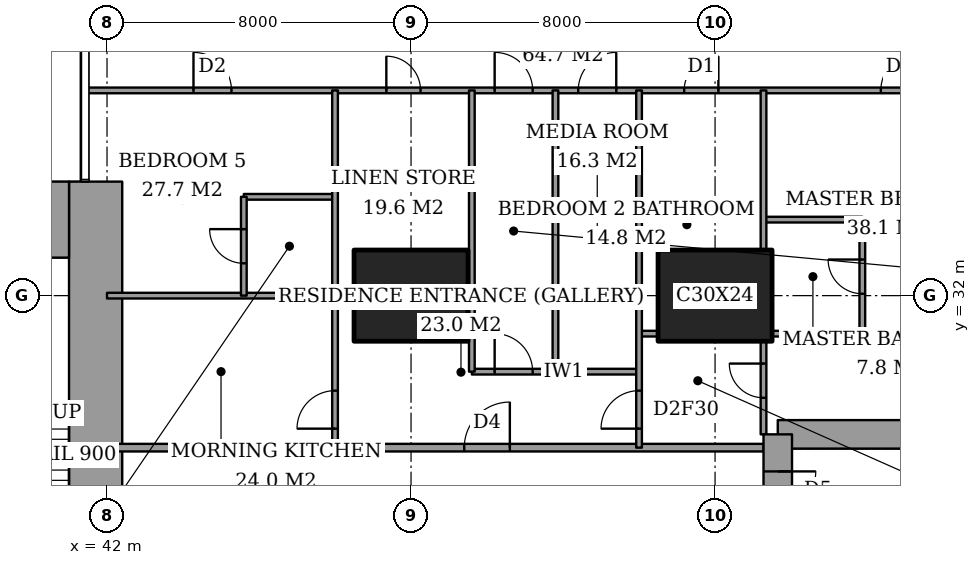
"""IFC4 building model, lengths in metres.
Left out: names, types, materials, properties, quantities, classifications, styles, units other than length and angle.
Written with IfcOpenShell. Run it as: python <this file> out.ifc"""

import sys

from ifc_helpers import new_model, si_unit, direction, frame, frame_2d, origin, origin_2d, place, context, subcontext, project, spatial, rectangle, extrude, element, fill, save


model = new_model("IFC4")
c1 = context("Model", 3, precision=1e-05, world=origin(), true_north=direction((0.0, 1.0)))
c2 = subcontext(c1, "Body", "Model", "MODEL_VIEW")
j1 = project(units=[si_unit("LENGTHUNIT", "METRE"), si_unit("PLANEANGLEUNIT", "RADIAN")], contexts=[c1])
p1 = place(None, origin())
s1 = spatial("IfcSite", under=j1, at=p1, CompositionType="ELEMENT")
p2 = place(p1, origin())
s2 = spatial("IfcBuilding", under=s1, at=p2, CompositionType="ELEMENT")
p3 = place(p2, frame((0.0, 0.0, 214.6)))
s3 = spatial("IfcBuildingStorey", under=s2, at=p3, CompositionType="ELEMENT", Elevation=214.6)
for number, where, z_axis, x_axis in (
    (1, (50.0, 32.0, 0.0), (0.0, 0.0, 1.0), (1.0, 0.0, 0.0)),
    (2, (58.0, 32.0, 0.0), (0.0, 0.0, 1.0), (1.0, 0.0, 0.0)),
):
    element("IfcColumn", number, at=place(p3, frame(where, z_axis=z_axis, x_axis=x_axis)), inside=s3, PredefinedType="COLUMN", context=c2, shape_type="SweptSolid", body=[
        extrude(rectangle(XDim=3.0, YDim=2.4, at=origin_2d()), origin(), (0.0, 0.0, 1.0), 3.6),
    ])
p4 = place(p3, frame((37.85, 34.0, 0.0), z_axis=(0.0, 0.0, 1.0), x_axis=(1.0, 0.0, 0.0)))
e3 = element("IfcWall", 3, at=p4, inside=s3, PredefinedType="SHEAR", context=c2, shape_type="SweptSolid", body=[
    extrude(rectangle(XDim=3.15, YDim=2.0, at=frame_2d((1.575, 0.0))), origin(), (0.0, 0.0, 1.0), 3.6),
])
p5 = place(p3, frame((41.7, 24.85, 0.0), z_axis=(0.0, 0.0, 1.0), x_axis=(0.0, 1.0, 0.0)))
e4 = element("IfcWall", 4, at=p5, inside=s3, PredefinedType="SHEAR", context=c2, shape_type="SweptSolid", body=[
    extrude(rectangle(XDim=10.15, YDim=1.4, at=frame_2d((5.075, 0.0))), origin(), (0.0, 0.0, 1.0), 3.6),
])
p6 = place(p3, frame((64.1, 28.35, 0.0), z_axis=(0.0, 0.0, 1.0), x_axis=(-1.0, 0.0, 0.0)))
e5 = element("IfcWall", 5, at=p6, inside=s3, PredefinedType="SHEAR", context=c2, shape_type="SweptSolid", body=[
    extrude(rectangle(XDim=4.45, YDim=0.75, at=frame_2d((2.225, 0.0))), origin(), (0.0, 0.0, 1.0), 3.6),
])
p7 = place(p3, frame((59.65, 28.35, 0.0), z_axis=(0.0, 0.0, 1.0), x_axis=(0.0, -1.0, 0.0)))
e6 = element("IfcWall", 6, at=p7, inside=s3, PredefinedType="SHEAR", context=c2, shape_type="SweptSolid", body=[
    extrude(rectangle(XDim=8.7, YDim=0.75, at=frame_2d((4.35, 0.0))), origin(), (0.0, 0.0, 1.0), 3.6),
])
p8 = place(p7, frame((0.975, 0.0, 0.0)))
e7 = element("IfcOpeningElement", 7, at=p8, cuts=e6, PredefinedType="OPENING", context=c2, shape_type="SweptSolid", body=[
    extrude(rectangle(XDim=1.0, YDim=2.1, at=frame_2d((0.5, 1.05))), frame((0.0, 0.385, 0.0), z_axis=(0.0, -1.0, 0.0), x_axis=(1.0, 0.0, 0.0)), (0.0, 0.0, 1.0), 0.77),
])
p9 = place(p3, frame((42.0, 28.0, 0.0), z_axis=(0.0, 0.0, 1.0), x_axis=(1.0, 0.0, 0.0)))
e8 = element("IfcWall", 8, at=p9, inside=s3, PredefinedType="PARTITIONING", context=c2, shape_type="SweptSolid", body=[
    extrude(rectangle(XDim=17.275, YDim=0.2, at=frame_2d((8.637, 0.0))), origin(), (0.0, 0.0, 1.0), 3.35),
])
p10 = place(p9, frame((9.4, 0.0, 0.0)))
e9 = element("IfcOpeningElement", 9, at=p10, cuts=e8, PredefinedType="OPENING", context=c2, shape_type="SweptSolid", body=[
    extrude(rectangle(XDim=1.2, YDim=2.4, at=frame_2d((0.6, 1.2))), frame((0.0, 0.11, 0.0), z_axis=(0.0, -1.0, 0.0), x_axis=(1.0, 0.0, 0.0)), (0.0, 0.0, 1.0), 0.22),
])
p11 = place(p3, frame((51.6, 30.0, 0.0), z_axis=(0.0, 0.0, 1.0), x_axis=(1.0, 0.0, 0.0)))
e10 = element("IfcWall", 10, at=p11, inside=s3, PredefinedType="PARTITIONING", context=c2, shape_type="SweptSolid", body=[
    extrude(rectangle(XDim=4.4, YDim=0.15, at=frame_2d((2.2, 0.0))), origin(), (0.0, 0.0, 1.0), 3.35),
])
p12 = place(p11, frame((0.6, 0.0, 0.0)))
e11 = element("IfcOpeningElement", 11, at=p12, cuts=e10, PredefinedType="OPENING", context=c2, shape_type="SweptSolid", body=[
    extrude(rectangle(XDim=1.0, YDim=2.1, at=frame_2d((0.5, 1.05))), frame((0.0, 0.085, 0.0), z_axis=(0.0, -1.0, 0.0), x_axis=(1.0, 0.0, 0.0)), (0.0, 0.0, 1.0), 0.17),
])
p13 = place(p3, frame((56.0, 31.0, 0.0), z_axis=(0.0, 0.0, 1.0), x_axis=(1.0, 0.0, 0.0)))
e12 = element("IfcWall", 12, at=p13, inside=s3, PredefinedType="PARTITIONING", context=c2, shape_type="SweptSolid", body=[
    extrude(rectangle(XDim=0.5, YDim=0.15, at=frame_2d((0.25, 0.0))), origin(), (0.0, 0.0, 1.0), 3.35),
])
p14 = place(p3, frame((59.5, 31.0, 0.0), z_axis=(0.0, 0.0, 1.0), x_axis=(1.0, 0.0, 0.0)))
e13 = element("IfcWall", 13, at=p14, inside=s3, PredefinedType="PARTITIONING", context=c2, shape_type="SweptSolid", body=[
    extrude(rectangle(XDim=6.95, YDim=0.15, at=frame_2d((3.475, 0.0))), origin(), (0.0, 0.0, 1.0), 3.35),
])
p15 = place(p3, frame((48.0, 31.95, 0.0), z_axis=(0.0, 0.0, 1.0), x_axis=(1.0, 0.0, 0.0)))
e14 = element("IfcWall", 14, at=p15, inside=s3, PredefinedType="PARTITIONING", context=c2, shape_type="SweptSolid", body=[
    extrude(rectangle(XDim=0.5, YDim=0.15, at=frame_2d((0.25, 0.0))), origin(), (0.0, 0.0, 1.0), 2.634),
])
p16 = place(p3, frame((42.0, 32.0, 0.0), z_axis=(0.0, 0.0, 1.0), x_axis=(1.0, 0.0, 0.0)))
e15 = element("IfcWall", 15, at=p16, inside=s3, PredefinedType="PARTITIONING", context=c2, shape_type="SweptSolid", body=[
    extrude(rectangle(XDim=6.0, YDim=0.15, at=frame_2d((3.0, 0.0))), origin(), (0.0, 0.0, 1.0), 2.634),
])
p17 = place(p3, frame((59.275, 34.0, 0.0), z_axis=(0.0, 0.0, 1.0), x_axis=(1.0, 0.0, 0.0)))
e16 = element("IfcWall", 16, at=p17, inside=s3, PredefinedType="PARTITIONING", context=c2, shape_type="SweptSolid", body=[
    extrude(rectangle(XDim=2.6, YDim=0.15, at=frame_2d((1.3, 0.0))), origin(), (0.0, 0.0, 1.0), 3.35),
])
p18 = place(p3, frame((45.6, 34.6, 0.0), z_axis=(0.0, 0.0, 1.0), x_axis=(1.0, 0.0, 0.0)))
e17 = element("IfcWall", 17, at=p18, inside=s3, PredefinedType="PARTITIONING", context=c2, shape_type="SweptSolid", body=[
    extrude(rectangle(XDim=2.4, YDim=0.15, at=frame_2d((1.2, 0.0))), origin(), (0.0, 0.0, 1.0), 3.35),
])
p19 = place(p3, frame((41.439, 37.4, 0.0), z_axis=(0.0, 0.0, 1.0), x_axis=(1.0, 0.0, 0.0)))
e18 = element("IfcWall", 18, at=p19, inside=s3, PredefinedType="PARTITIONING", context=c2, shape_type="SweptSolid", body=[
    extrude(rectangle(XDim=25.011, YDim=0.15, at=frame_2d((12.505, 0.0))), origin(), (0.0, 0.0, 1.0), 3.35),
])
p20 = place(p19, frame((10.761, 0.0, 0.0)))
e19 = element("IfcOpeningElement", 19, at=p20, cuts=e18, PredefinedType="OPENING", context=c2, shape_type="SweptSolid", body=[
    extrude(rectangle(XDim=1.0, YDim=2.1, at=frame_2d((0.5, 1.05))), frame((0.0, 0.085, 0.0), z_axis=(0.0, -1.0, 0.0), x_axis=(1.0, 0.0, 0.0)), (0.0, 0.0, 1.0), 0.17),
])
p21 = place(p19, frame((20.924, 0.0, 0.0)))
e20 = element("IfcOpeningElement", 20, at=p21, cuts=e18, PredefinedType="OPENING", context=c2, shape_type="SweptSolid", body=[
    extrude(rectangle(XDim=1.0, YDim=2.1, at=frame_2d((0.5, 1.05))), frame((0.0, 0.085, 0.0), z_axis=(0.0, -1.0, 0.0), x_axis=(1.0, 0.0, 0.0)), (0.0, 0.0, 1.0), 0.17),
])
p22 = place(p19, frame((15.749, 0.0, 0.0)))
e21 = element("IfcOpeningElement", 21, at=p22, cuts=e18, PredefinedType="OPENING", context=c2, shape_type="SweptSolid", body=[
    extrude(rectangle(XDim=0.9, YDim=2.1, at=frame_2d((0.45, 1.05))), frame((0.0, 0.085, 0.0), z_axis=(0.0, -1.0, 0.0), x_axis=(1.0, 0.0, 0.0)), (0.0, 0.0, 1.0), 0.17),
])
p23 = place(p19, frame((12.961, 0.0, 0.0)))
e22 = element("IfcOpeningElement", 22, at=p23, cuts=e18, PredefinedType="OPENING", context=c2, shape_type="SweptSolid", body=[
    extrude(rectangle(XDim=1.0, YDim=2.1, at=frame_2d((0.5, 1.05))), frame((0.0, 0.085, 0.0), z_axis=(0.0, -1.0, 0.0), x_axis=(1.0, 0.0, 0.0)), (0.0, 0.0, 1.0), 0.17),
])
p24 = place(p19, frame((7.911, 0.0, 0.0)))
e23 = element("IfcOpeningElement", 23, at=p24, cuts=e18, PredefinedType="OPENING", context=c2, shape_type="SweptSolid", body=[
    extrude(rectangle(XDim=0.9, YDim=2.1, at=frame_2d((0.45, 1.05))), frame((0.0, 0.085, 0.0), z_axis=(0.0, -1.0, 0.0), x_axis=(1.0, 0.0, 0.0)), (0.0, 0.0, 1.0), 0.17),
])
p25 = place(p19, frame((2.836, 0.0, 0.0)))
e24 = element("IfcOpeningElement", 24, at=p25, cuts=e18, PredefinedType="OPENING", context=c2, shape_type="SweptSolid", body=[
    extrude(rectangle(XDim=1.0, YDim=2.1, at=frame_2d((0.5, 1.05))), frame((0.0, 0.085, 0.0), z_axis=(0.0, -1.0, 0.0), x_axis=(1.0, 0.0, 0.0)), (0.0, 0.0, 1.0), 0.17),
])
p26 = place(p3, frame((45.6, 32.0, 0.0), z_axis=(0.0, 0.0, 1.0), x_axis=(0.0, 1.0, 0.0)))
e25 = element("IfcWall", 25, at=p26, inside=s3, PredefinedType="PARTITIONING", context=c2, shape_type="SweptSolid", body=[
    extrude(rectangle(XDim=2.6, YDim=0.15, at=frame_2d((1.3, 0.0))), origin(), (0.0, 0.0, 1.0), 3.35),
])
p27 = place(p26, frame((0.85, 0.0, 0.0)))
e26 = element("IfcOpeningElement", 26, at=p27, cuts=e25, PredefinedType="OPENING", context=c2, shape_type="SweptSolid", body=[
    extrude(rectangle(XDim=0.9, YDim=2.1, at=frame_2d((0.45, 1.05))), frame((0.0, 0.085, 0.0), z_axis=(0.0, -1.0, 0.0), x_axis=(1.0, 0.0, 0.0)), (0.0, 0.0, 1.0), 0.17),
])
p28 = place(p3, frame((48.0, 28.0, 0.0), z_axis=(0.0, 0.0, 1.0), x_axis=(0.0, 1.0, 0.0)))
e27 = element("IfcWall", 27, at=p28, inside=s3, PredefinedType="PARTITIONING", context=c2, shape_type="SweptSolid", body=[
    extrude(rectangle(XDim=9.4, YDim=0.15, at=frame_2d((4.7, 0.0))), origin(), (0.0, 0.0, 1.0), 3.35),
])
p29 = place(p28, frame((0.5, 0.0, 0.0)))
e28 = element("IfcOpeningElement", 28, at=p29, cuts=e27, PredefinedType="OPENING", context=c2, shape_type="SweptSolid", body=[
    extrude(rectangle(XDim=1.0, YDim=2.1, at=frame_2d((0.5, 1.05))), frame((0.0, 0.085, 0.0), z_axis=(0.0, -1.0, 0.0), x_axis=(1.0, 0.0, 0.0)), (0.0, 0.0, 1.0), 0.17),
])
for number, where, z_axis, x_axis in (
    (29, (51.6, 30.0, 0.0), (0.0, 0.0, 1.0), (0.0, 1.0, 0.0)),
    (30, (53.8, 30.0, 0.0), (0.0, 0.0, 1.0), (0.0, 1.0, 0.0)),
):
    element("IfcWall", number, at=place(p3, frame(where, z_axis=z_axis, x_axis=x_axis)), inside=s3, PredefinedType="PARTITIONING", context=c2, shape_type="SweptSolid", body=[
        extrude(rectangle(XDim=7.4, YDim=0.15, at=frame_2d((3.7, 0.0))), origin(), (0.0, 0.0, 1.0), 3.35),
    ])
p30 = place(p3, frame((56.0, 28.0, 0.0), z_axis=(0.0, 0.0, 1.0), x_axis=(0.0, 1.0, 0.0)))
e31 = element("IfcWall", 31, at=p30, inside=s3, PredefinedType="PARTITIONING", context=c2, shape_type="SweptSolid", body=[
    extrude(rectangle(XDim=9.4, YDim=0.15, at=frame_2d((4.7, 0.0))), origin(), (0.0, 0.0, 1.0), 3.35),
])
p31 = place(p30, frame((0.5, 0.0, 0.0)))
e32 = element("IfcOpeningElement", 32, at=p31, cuts=e31, PredefinedType="OPENING", context=c2, shape_type="SweptSolid", body=[
    extrude(rectangle(XDim=1.0, YDim=2.1, at=frame_2d((0.5, 1.05))), frame((0.0, 0.085, 0.0), z_axis=(0.0, -1.0, 0.0), x_axis=(1.0, 0.0, 0.0)), (0.0, 0.0, 1.0), 0.17),
])
p32 = place(p3, frame((59.275, 28.35, 0.0), z_axis=(0.0, 0.0, 1.0), x_axis=(0.0, 1.0, 0.0)))
e33 = element("IfcWall", 33, at=p32, inside=s3, PredefinedType="PARTITIONING", context=c2, shape_type="SweptSolid", body=[
    extrude(rectangle(XDim=2.45, YDim=0.15, at=frame_2d((1.225, 0.0))), origin(), (0.0, 0.0, 1.0), 3.35),
])
p33 = place(p32, frame((0.962, 0.0, 0.0)))
e34 = element("IfcOpeningElement", 34, at=p33, cuts=e33, PredefinedType="OPENING", context=c2, shape_type="SweptSolid", body=[
    extrude(rectangle(XDim=0.9, YDim=2.1, at=frame_2d((0.45, 1.05))), frame((0.0, 0.085, 0.0), z_axis=(0.0, -1.0, 0.0), x_axis=(1.0, 0.0, 0.0)), (0.0, 0.0, 1.0), 0.17),
])
p34 = place(p3, frame((59.275, 33.2, 0.0), z_axis=(0.0, 0.0, 1.0), x_axis=(0.0, 1.0, 0.0)))
e35 = element("IfcWall", 35, at=p34, inside=s3, PredefinedType="PARTITIONING", context=c2, shape_type="SweptSolid", body=[
    extrude(rectangle(XDim=4.2, YDim=0.15, at=frame_2d((2.1, 0.0))), origin(), (0.0, 0.0, 1.0), 3.35),
])
p35 = place(p3, frame((61.875, 31.0, 0.0), z_axis=(0.0, 0.0, 1.0), x_axis=(0.0, 1.0, 0.0)))
e36 = element("IfcWall", 36, at=p35, inside=s3, PredefinedType="PARTITIONING", context=c2, shape_type="SweptSolid", body=[
    extrude(rectangle(XDim=3.0, YDim=0.15, at=frame_2d((1.5, 0.0))), origin(), (0.0, 0.0, 1.0), 3.35),
])
p36 = place(p35, frame((1.05, 0.0, 0.0)))
e37 = element("IfcOpeningElement", 37, at=p36, cuts=e36, PredefinedType="OPENING", context=c2, shape_type="SweptSolid", body=[
    extrude(rectangle(XDim=0.9, YDim=2.1, at=frame_2d((0.45, 1.05))), frame((0.0, 0.085, 0.0), z_axis=(0.0, -1.0, 0.0), x_axis=(1.0, 0.0, 0.0)), (0.0, 0.0, 1.0), 0.17),
])
p37 = place(p20, origin())
e38 = element("IfcDoor", 38, at=p37, inside=s3, OperationType="SINGLE_SWING_RIGHT", PredefinedType="DOOR", context=c2, shape_type="SweptSolid", body=[
    extrude(rectangle(XDim=1.0, YDim=2.1, at=frame_2d((0.5, 1.05))), frame((0.0, 0.025, 0.0), z_axis=(0.0, -1.0, 0.0), x_axis=(1.0, 0.0, 0.0)), (0.0, 0.0, 1.0), 0.05),
])
fill(e19, e38)
p38 = place(p36, origin())
e39 = element("IfcDoor", 39, at=p38, inside=s3, OperationType="SINGLE_SWING_LEFT", PredefinedType="DOOR", context=c2, shape_type="SweptSolid", body=[
    extrude(rectangle(XDim=0.9, YDim=2.1, at=frame_2d((0.45, 1.05))), frame((0.0, 0.025, 0.0), z_axis=(0.0, -1.0, 0.0), x_axis=(1.0, 0.0, 0.0)), (0.0, 0.0, 1.0), 0.05),
])
fill(e37, e39)
p39 = place(p21, origin())
e40 = element("IfcDoor", 40, at=p39, inside=s3, OperationType="SINGLE_SWING_LEFT", PredefinedType="DOOR", context=c2, shape_type="SweptSolid", body=[
    extrude(rectangle(XDim=1.0, YDim=2.1, at=frame_2d((0.5, 1.05))), frame((0.0, 0.025, 0.0), z_axis=(0.0, -1.0, 0.0), x_axis=(1.0, 0.0, 0.0)), (0.0, 0.0, 1.0), 0.05),
])
fill(e20, e40)
p40 = place(p33, origin())
e41 = element("IfcDoor", 41, at=p40, inside=s3, OperationType="SINGLE_SWING_LEFT", PredefinedType="DOOR", context=c2, shape_type="SweptSolid", body=[
    extrude(rectangle(XDim=0.9, YDim=2.1, at=frame_2d((0.45, 1.05))), frame((0.0, 0.025, 0.0), z_axis=(0.0, -1.0, 0.0), x_axis=(1.0, 0.0, 0.0)), (0.0, 0.0, 1.0), 0.05),
])
fill(e34, e41)
p41 = place(p22, origin())
e42 = element("IfcDoor", 42, at=p41, inside=s3, OperationType="SINGLE_SWING_LEFT", PredefinedType="DOOR", context=c2, shape_type="SweptSolid", body=[
    extrude(rectangle(XDim=0.9, YDim=2.1, at=frame_2d((0.45, 1.05))), frame((0.0, 0.025, 0.0), z_axis=(0.0, -1.0, 0.0), x_axis=(1.0, 0.0, 0.0)), (0.0, 0.0, 1.0), 0.05),
])
fill(e21, e42)
p42 = place(p31, origin())
e43 = element("IfcDoor", 43, at=p42, inside=s3, OperationType="SINGLE_SWING_RIGHT", PredefinedType="DOOR", context=c2, shape_type="SweptSolid", body=[
    extrude(rectangle(XDim=1.0, YDim=2.1, at=frame_2d((0.5, 1.05))), frame((0.0, 0.025, 0.0), z_axis=(0.0, -1.0, 0.0), x_axis=(1.0, 0.0, 0.0)), (0.0, 0.0, 1.0), 0.05),
])
fill(e32, e43)
p43 = place(p10, origin())
e44 = element("IfcDoor", 44, at=p43, inside=s3, OperationType="SINGLE_SWING_LEFT", PredefinedType="DOOR", context=c2, shape_type="SweptSolid", body=[
    extrude(rectangle(XDim=1.2, YDim=2.4, at=frame_2d((0.6, 1.2))), frame((0.0, 0.025, 0.0), z_axis=(0.0, -1.0, 0.0), x_axis=(1.0, 0.0, 0.0)), (0.0, 0.0, 1.0), 0.05),
])
fill(e9, e44)
p44 = place(p23, origin())
e45 = element("IfcDoor", 45, at=p44, inside=s3, OperationType="SINGLE_SWING_LEFT", PredefinedType="DOOR", context=c2, shape_type="SweptSolid", body=[
    extrude(rectangle(XDim=1.0, YDim=2.1, at=frame_2d((0.5, 1.05))), frame((0.0, 0.025, 0.0), z_axis=(0.0, -1.0, 0.0), x_axis=(1.0, 0.0, 0.0)), (0.0, 0.0, 1.0), 0.05),
])
fill(e22, e45)
p45 = place(p12, origin())
e46 = element("IfcDoor", 46, at=p45, inside=s3, OperationType="SINGLE_SWING_RIGHT", PredefinedType="DOOR", context=c2, shape_type="SweptSolid", body=[
    extrude(rectangle(XDim=1.0, YDim=2.1, at=frame_2d((0.5, 1.05))), frame((0.0, 0.025, 0.0), z_axis=(0.0, -1.0, 0.0), x_axis=(1.0, 0.0, 0.0)), (0.0, 0.0, 1.0), 0.05),
])
fill(e11, e46)
p46 = place(p24, origin())
e47 = element("IfcDoor", 47, at=p46, inside=s3, OperationType="SINGLE_SWING_RIGHT", PredefinedType="DOOR", context=c2, shape_type="SweptSolid", body=[
    extrude(rectangle(XDim=0.9, YDim=2.1, at=frame_2d((0.45, 1.05))), frame((0.0, 0.025, 0.0), z_axis=(0.0, -1.0, 0.0), x_axis=(1.0, 0.0, 0.0)), (0.0, 0.0, 1.0), 0.05),
])
fill(e23, e47)
p47 = place(p27, origin())
e48 = element("IfcDoor", 48, at=p47, inside=s3, OperationType="SINGLE_SWING_LEFT", PredefinedType="DOOR", context=c2, shape_type="SweptSolid", body=[
    extrude(rectangle(XDim=0.9, YDim=2.1, at=frame_2d((0.45, 1.05))), frame((0.0, 0.025, 0.0), z_axis=(0.0, -1.0, 0.0), x_axis=(1.0, 0.0, 0.0)), (0.0, 0.0, 1.0), 0.05),
])
fill(e26, e48)
p48 = place(p25, origin())
e49 = element("IfcDoor", 49, at=p48, inside=s3, OperationType="SINGLE_SWING_RIGHT", PredefinedType="DOOR", context=c2, shape_type="SweptSolid", body=[
    extrude(rectangle(XDim=1.0, YDim=2.1, at=frame_2d((0.5, 1.05))), frame((0.0, 0.025, 0.0), z_axis=(0.0, -1.0, 0.0), x_axis=(1.0, 0.0, 0.0)), (0.0, 0.0, 1.0), 0.05),
])
fill(e24, e49)
p49 = place(p29, origin())
e50 = element("IfcDoor", 50, at=p49, inside=s3, OperationType="SINGLE_SWING_RIGHT", PredefinedType="DOOR", context=c2, shape_type="SweptSolid", body=[
    extrude(rectangle(XDim=1.0, YDim=2.1, at=frame_2d((0.5, 1.05))), frame((0.0, 0.025, 0.0), z_axis=(0.0, -1.0, 0.0), x_axis=(1.0, 0.0, 0.0)), (0.0, 0.0, 1.0), 0.05),
])
fill(e28, e50)
p50 = place(p8, origin())
e51 = element("IfcDoor", 51, at=p50, inside=s3, OperationType="SINGLE_SWING_RIGHT", PredefinedType="DOOR", context=c2, shape_type="SweptSolid", body=[
    extrude(rectangle(XDim=1.0, YDim=2.1, at=frame_2d((0.5, 1.05))), frame((0.0, 0.025, 0.0), z_axis=(0.0, -1.0, 0.0), x_axis=(1.0, 0.0, 0.0)), (0.0, 0.0, 1.0), 0.05),
])
fill(e7, e51)
save(model, sys.argv[1])
